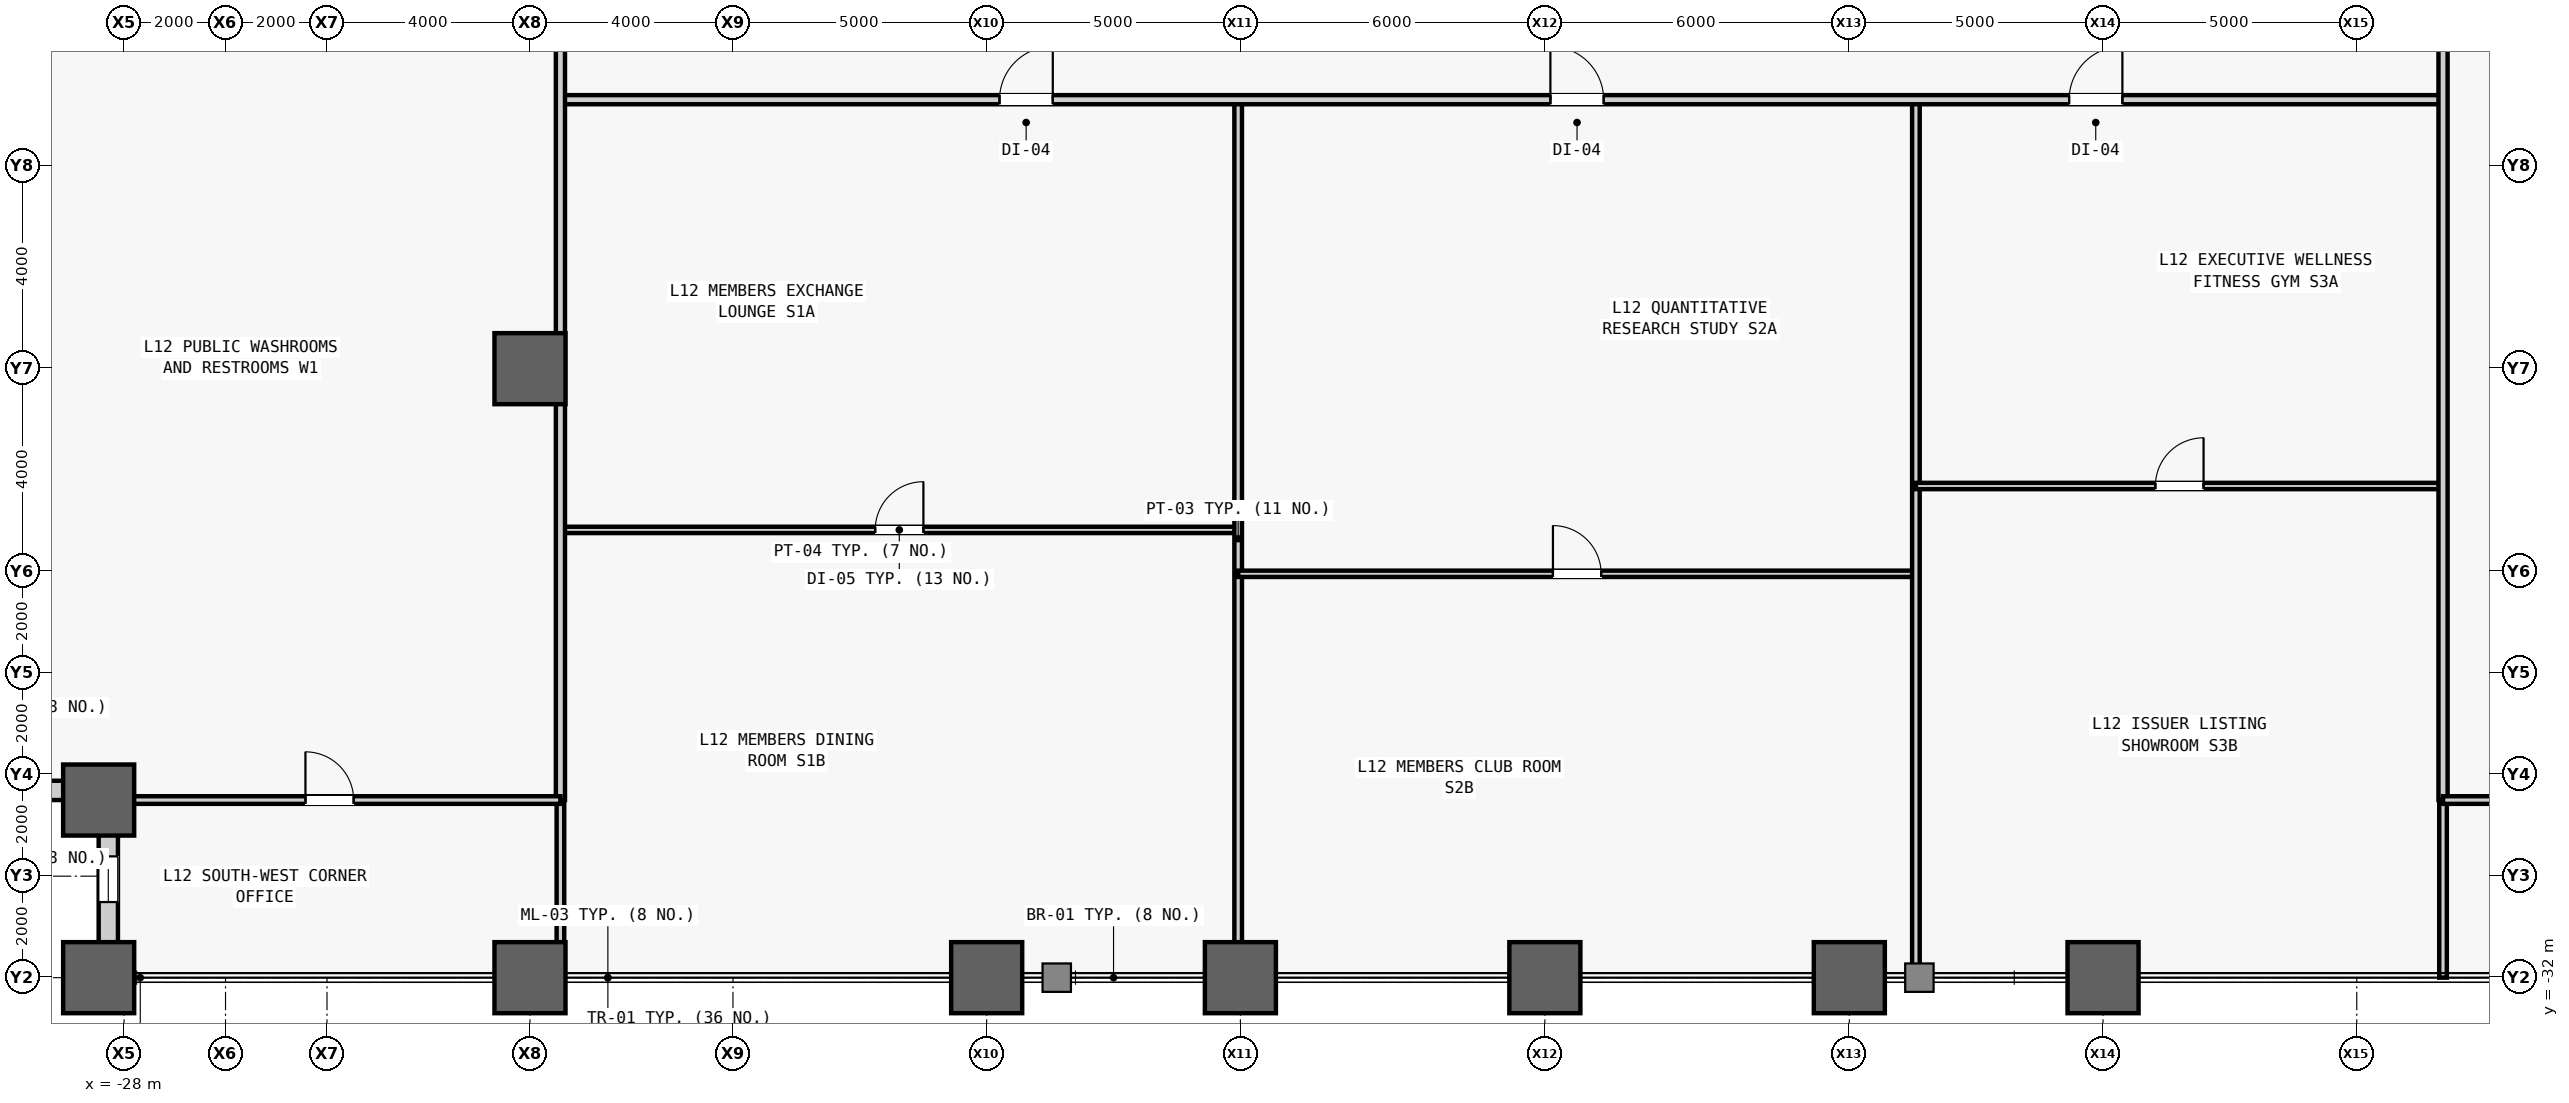
"""IFC4 building model, lengths in metres.
Left out: names, types, materials, properties, quantities, classifications, styles, units other than length and angle.
Written with IfcOpenShell. Run it as: python <this file> out.ifc"""

import sys

from ifc_helpers import new_model, si_unit, direction, frame, frame_2d, origin, origin_2d, place, context, subcontext, project, spatial, rectangle, hollow_rectangle, extrude, source, transform, mapped, element, fill, save


model = new_model("IFC4")
c1 = context("Model", 3, precision=1e-05, world=origin(), true_north=direction((0.0, 1.0)))
c2 = subcontext(c1, "Body", "Model", "MODEL_VIEW")
j1 = project(units=[si_unit("LENGTHUNIT", "METRE"), si_unit("PLANEANGLEUNIT", "RADIAN")], contexts=[c1])
p1 = place(None, origin())
s1 = spatial("IfcSite", under=j1, at=p1, CompositionType="ELEMENT")
p2 = place(p1, origin())
s2 = spatial("IfcBuilding", under=s1, at=p2, CompositionType="ELEMENT")
p3 = place(p2, frame((0.0, 0.0, 57.8)))
s3 = spatial("IfcBuildingStorey", under=s2, at=p3, CompositionType="ELEMENT", Elevation=57.8)
m1 = source(origin(), c2, "Body", "SweptSolid", [
    extrude(hollow_rectangle(XDim=1.4, YDim=1.4, WallThickness=0.075, at=origin_2d()), origin(), (0.0, 0.0, 1.0), 4.2),
])
for number, where, z_axis, x_axis in (
    (1, (-28.5, -32.0, 0.0), (0.0, 0.0, 1.0), (1.0, 0.0, 0.0)),
    (2, (-28.5, -28.5, 0.0), (0.0, 0.0, 1.0), (1.0, 0.0, 0.0)),
    (3, (-20.0, -32.0, 0.0), (0.0, 0.0, 1.0), (1.0, 0.0, 0.0)),
    (4, (-20.0, -20.0, 0.0), (0.0, 0.0, 1.0), (1.0, 0.0, 0.0)),
    (5, (-11.0, -32.0, 0.0), (0.0, 0.0, 1.0), (1.0, 0.0, 0.0)),
    (6, (-6.0, -32.0, 0.0), (0.0, 0.0, 1.0), (1.0, 0.0, 0.0)),
    (7, (0.0, -32.0, 0.0), (0.0, 0.0, 1.0), (1.0, 0.0, 0.0)),
    (8, (6.0, -32.0, 0.0), (0.0, 0.0, 1.0), (1.0, 0.0, 0.0)),
    (9, (11.0, -32.0, 0.0), (0.0, 0.0, 1.0), (1.0, 0.0, 0.0)),
):
    element("IfcColumn", number, at=place(p3, frame(where, z_axis=z_axis, x_axis=x_axis)), inside=s3, PredefinedType="COLUMN", context=c2, shape_type="MappedRepresentation", body=[
        mapped(m1, transform((0.0, 0.0, 0.0), scale=1.0)),
    ])
m2 = source(origin(), c2, "Body", "SweptSolid", [
    extrude(rectangle(XDim=3.12, YDim=0.38, at=frame_2d((1.56, 0.0))), origin(), (0.0, 0.0, 1.0), 3.245),
])
p4 = place(p3, frame((-28.5, -28.31, 0.0), z_axis=(0.0, 0.0, 1.0), x_axis=(-1.0, 0.0, 0.0)))
e10 = element("IfcWall", 10, at=p4, inside=s3, PredefinedType="STANDARD", context=c2, shape_type="MappedRepresentation", body=[
    mapped(m2, transform((0.0, 0.0, 0.0), scale=1.0)),
])
m3 = source(origin(), c2, "Body", "SweptSolid", [
    extrude(rectangle(XDim=0.9, YDim=2.4, at=frame_2d((0.45, 1.2))), frame((0.0, 0.2, 0.0), z_axis=(0.0, -1.0, 0.0), x_axis=(1.0, 0.0, 0.0)), (0.0, 0.0, 1.0), 0.4),
])
p5 = place(p4, frame((1.11, 0.0, 0.5)))
e11 = element("IfcOpeningElement", 11, at=p5, cuts=e10, PredefinedType="OPENING", context=c2, shape_type="MappedRepresentation", body=[
    mapped(m3, transform((0.0, 0.0, 0.0), scale=1.0)),
])
p6 = place(p3, frame((-28.31, -31.62, 0.0), z_axis=(0.0, 0.0, 1.0), x_axis=(0.0, 1.0, 0.0)))
e12 = element("IfcWall", 12, at=p6, inside=s3, PredefinedType="STANDARD", context=c2, shape_type="MappedRepresentation", body=[
    mapped(m2, transform((0.0, 0.0, 0.0), scale=1.0)),
])
p7 = place(p6, frame((1.11, 0.0, 0.5)))
e13 = element("IfcOpeningElement", 13, at=p7, cuts=e12, PredefinedType="OPENING", context=c2, shape_type="MappedRepresentation", body=[
    mapped(m3, transform((0.0, 0.0, 0.0), scale=1.0)),
])
m4 = source(origin(), c2, "Body", "SweptSolid", [
    extrude(rectangle(XDim=13.356, YDim=0.125, at=frame_2d((6.678, 0.0))), origin(), (0.0, 0.0, 1.0), 3.94),
])
p8 = place(p3, frame((-19.4, -23.177, 0.0), z_axis=(0.0, 0.0, 1.0), x_axis=(1.0, 0.0, 0.0)))
e14 = element("IfcWall", 14, at=p8, inside=s3, PredefinedType="PARTITIONING", context=c2, shape_type="MappedRepresentation", body=[
    mapped(m4, transform((0.0, 0.0, 0.0), scale=1.0)),
])
m5 = source(origin(), c2, "Body", "SweptSolid", [
    extrude(rectangle(XDim=0.95, YDim=2.15, at=frame_2d((0.475, 1.075))), frame((0.0, 0.073, 0.0), z_axis=(0.0, -1.0, 0.0), x_axis=(1.0, 0.0, 0.0)), (0.0, 0.0, 1.0), 0.145),
])
p9 = place(p8, frame((6.203, 0.0, 0.0)))
e15 = element("IfcOpeningElement", 15, at=p9, cuts=e14, PredefinedType="OPENING", context=c2, shape_type="MappedRepresentation", body=[
    mapped(m5, transform((0.0, 0.0, 0.0), scale=1.0)),
])
m6 = source(origin(), c2, "Body", "SweptSolid", [
    extrude(rectangle(XDim=17.3, YDim=0.15, at=frame_2d((8.65, 0.0))), origin(), (0.0, 0.0, 1.0), 3.085),
])
p10 = place(p3, frame((-6.044, -32.0, 0.0), z_axis=(0.0, 0.0, 1.0), x_axis=(0.0, 1.0, 0.0)))
e16 = element("IfcWall", 16, at=p10, inside=s3, PredefinedType="PARTITIONING", context=c2, shape_type="MappedRepresentation", body=[
    mapped(m6, transform((0.0, 0.0, 0.0), scale=1.0)),
])
p11 = place(p3, frame((-6.044, -24.042, 0.0), z_axis=(0.0, 0.0, 1.0), x_axis=(1.0, 0.0, 0.0)))
e17 = element("IfcWall", 17, at=p11, inside=s3, PredefinedType="PARTITIONING", context=c2, shape_type="MappedRepresentation", body=[
    mapped(m4, transform((0.0, 0.0, 0.0), scale=1.0)),
])
p12 = place(p11, frame((6.203, 0.0, 0.0)))
e18 = element("IfcOpeningElement", 18, at=p12, cuts=e17, PredefinedType="OPENING", context=c2, shape_type="MappedRepresentation", body=[
    mapped(m5, transform((0.0, 0.0, 0.0), scale=1.0)),
])
m7 = source(origin(), c2, "Body", "SweptSolid", [
    extrude(rectangle(XDim=17.3, YDim=0.15, at=frame_2d((8.65, 0.0))), origin(), (0.0, 0.0, 1.0), 3.94),
])
p13 = place(p3, frame((7.312, -32.0, 0.0), z_axis=(0.0, 0.0, 1.0), x_axis=(0.0, 1.0, 0.0)))
e19 = element("IfcWall", 19, at=p13, inside=s3, PredefinedType="PARTITIONING", context=c2, shape_type="MappedRepresentation", body=[
    mapped(m7, transform((0.0, 0.0, 0.0), scale=1.0)),
])
m8 = source(origin(), c2, "Body", "SweptSolid", [
    extrude(rectangle(XDim=10.388, YDim=0.125, at=frame_2d((5.194, 0.0))), origin(), (0.0, 0.0, 1.0), 3.94),
])
p14 = place(p3, frame((7.312, -22.312, 0.0), z_axis=(0.0, 0.0, 1.0), x_axis=(1.0, 0.0, 0.0)))
e20 = element("IfcWall", 20, at=p14, inside=s3, PredefinedType="PARTITIONING", context=c2, shape_type="MappedRepresentation", body=[
    mapped(m8, transform((0.0, 0.0, 0.0), scale=1.0)),
])
p15 = place(p14, frame((4.719, 0.0, 0.0)))
e21 = element("IfcOpeningElement", 21, at=p15, cuts=e20, PredefinedType="OPENING", context=c2, shape_type="MappedRepresentation", body=[
    mapped(m5, transform((0.0, 0.0, 0.0), scale=1.0)),
])
m9 = source(origin(), c2, "Body", "SweptSolid", [
    extrude(rectangle(XDim=37.1, YDim=0.18, at=frame_2d((18.55, 0.0))), origin(), (0.0, 0.0, 1.0), 3.94),
])
p16 = place(p3, frame((-19.4, -14.7, 0.0), z_axis=(0.0, 0.0, 1.0), x_axis=(1.0, 0.0, 0.0)))
e22 = element("IfcWall", 22, at=p16, inside=s3, PredefinedType="PARTITIONING", context=c2, shape_type="MappedRepresentation", body=[
    mapped(m9, transform((0.0, 0.0, 0.0), scale=1.0)),
])
m10 = source(origin(), c2, "Body", "SweptSolid", [
    extrude(rectangle(XDim=1.05, YDim=2.2, at=frame_2d((0.525, 1.1))), frame((0.0, 0.1, 0.0), z_axis=(0.0, -1.0, 0.0), x_axis=(1.0, 0.0, 0.0)), (0.0, 0.0, 1.0), 0.2),
])
p17 = place(p16, frame((8.653, 0.0, 0.0)))
e23 = element("IfcOpeningElement", 23, at=p17, cuts=e22, PredefinedType="OPENING", context=c2, shape_type="MappedRepresentation", body=[
    mapped(m10, transform((0.0, 0.0, 0.0), scale=1.0)),
])
p18 = place(p16, frame((19.509, 0.0, 0.0)))
e24 = element("IfcOpeningElement", 24, at=p18, cuts=e22, PredefinedType="OPENING", context=c2, shape_type="MappedRepresentation", body=[
    mapped(m10, transform((0.0, 0.0, 0.0), scale=1.0)),
])
p19 = place(p16, frame((29.731, 0.0, 0.0)))
e25 = element("IfcOpeningElement", 25, at=p19, cuts=e22, PredefinedType="OPENING", context=c2, shape_type="MappedRepresentation", body=[
    mapped(m10, transform((0.0, 0.0, 0.0), scale=1.0)),
])
m11 = source(origin(), c2, "Body", "SweptSolid", [
    extrude(rectangle(XDim=3.5, YDim=0.15, at=frame_2d((1.75, 0.0))), origin(), (0.0, 0.0, 1.0), 3.94),
])
for number, where, z_axis, x_axis in (
    (26, (-19.4, -32.0, 0.0), (0.0, 0.0, 1.0), (0.0, 1.0, 0.0)),
    (27, (17.7, -32.0, 0.0), (0.0, 0.0, 1.0), (0.0, 1.0, 0.0)),
):
    element("IfcWall", number, at=place(p3, frame(where, z_axis=z_axis, x_axis=x_axis)), inside=s3, PredefinedType="PARTITIONING", context=c2, shape_type="MappedRepresentation", body=[
        mapped(m11, transform((0.0, 0.0, 0.0), scale=1.0)),
    ])
m12 = source(origin(), c2, "Body", "SweptSolid", [
    extrude(rectangle(XDim=57.0, YDim=0.18, at=frame_2d((28.5, 0.0))), origin(), (0.0, 0.0, 1.0), 3.471),
])
p20 = place(p3, frame((-19.4, -28.5, 0.0), z_axis=(0.0, 0.0, 1.0), x_axis=(0.0, 1.0, 0.0)))
e28 = element("IfcWall", 28, at=p20, inside=s3, PredefinedType="PARTITIONING", context=c2, shape_type="MappedRepresentation", body=[
    mapped(m12, transform((0.0, 0.0, 0.0), scale=1.0)),
])
m13 = source(origin(), c2, "Body", "SweptSolid", [
    extrude(rectangle(XDim=0.95, YDim=2.15, at=frame_2d((0.475, 1.075))), frame((0.0, 0.1, 0.0), z_axis=(0.0, -1.0, 0.0), x_axis=(1.0, 0.0, 0.0)), (0.0, 0.0, 1.0), 0.2),
])
p21 = place(p20, frame((16.455, 0.0, 0.0)))
e29 = element("IfcOpeningElement", 29, at=p21, cuts=e28, PredefinedType="OPENING", context=c2, shape_type="MappedRepresentation", body=[
    mapped(m13, transform((0.0, 0.0, 0.0), scale=1.0)),
])
p22 = place(p20, frame((22.664, 0.0, 0.0)))
e30 = element("IfcOpeningElement", 30, at=p22, cuts=e28, PredefinedType="OPENING", context=c2, shape_type="MappedRepresentation", body=[
    mapped(m13, transform((0.0, 0.0, 0.0), scale=1.0)),
])
p23 = place(p20, frame((30.305, 0.0, 0.0)))
e31 = element("IfcOpeningElement", 31, at=p23, cuts=e28, PredefinedType="OPENING", context=c2, shape_type="MappedRepresentation", body=[
    mapped(m13, transform((0.0, 0.0, 0.0), scale=1.0)),
])
p24 = place(p20, frame((37.646, 0.0, 0.0)))
e32 = element("IfcOpeningElement", 32, at=p24, cuts=e28, PredefinedType="OPENING", context=c2, shape_type="MappedRepresentation", body=[
    mapped(m13, transform((0.0, 0.0, 0.0), scale=1.0)),
])
m14 = source(origin(), c2, "Body", "SweptSolid", [
    extrude(rectangle(XDim=57.0, YDim=0.18, at=frame_2d((28.5, 0.0))), origin(), (0.0, 0.0, 1.0), 3.94),
])
p25 = place(p3, frame((17.7, -28.5, 0.0), z_axis=(0.0, 0.0, 1.0), x_axis=(0.0, 1.0, 0.0)))
e33 = element("IfcWall", 33, at=p25, inside=s3, PredefinedType="PARTITIONING", context=c2, shape_type="MappedRepresentation", body=[
    mapped(m14, transform((0.0, 0.0, 0.0), scale=1.0)),
])
p26 = place(p25, frame((20.7, 0.0, 0.0)))
e34 = element("IfcOpeningElement", 34, at=p26, cuts=e33, PredefinedType="OPENING", context=c2, shape_type="MappedRepresentation", body=[
    mapped(m13, transform((0.0, 0.0, 0.0), scale=1.0)),
])
p27 = place(p25, frame((34.25, 0.0, 0.0)))
e35 = element("IfcOpeningElement", 35, at=p27, cuts=e33, PredefinedType="OPENING", context=c2, shape_type="MappedRepresentation", body=[
    mapped(m13, transform((0.0, 0.0, 0.0), scale=1.0)),
])
m15 = source(origin(), c2, "Body", "SweptSolid", [
    extrude(rectangle(XDim=9.1, YDim=0.15, at=frame_2d((4.55, 0.0))), origin(), (0.0, 0.0, 1.0), 3.94),
])
p28 = place(p3, frame((-28.5, -28.5, 0.0), z_axis=(0.0, 0.0, 1.0), x_axis=(1.0, 0.0, 0.0)))
e36 = element("IfcWall", 36, at=p28, inside=s3, PredefinedType="PARTITIONING", context=c2, shape_type="MappedRepresentation", body=[
    mapped(m15, transform((0.0, 0.0, 0.0), scale=1.0)),
])
m16 = source(origin(), c2, "Body", "SweptSolid", [
    extrude(rectangle(XDim=0.95, YDim=2.15, at=frame_2d((0.475, 1.075))), frame((0.0, 0.085, 0.0), z_axis=(0.0, -1.0, 0.0), x_axis=(1.0, 0.0, 0.0)), (0.0, 0.0, 1.0), 0.17),
])
p29 = place(p28, frame((4.075, 0.0, 0.0)))
e37 = element("IfcOpeningElement", 37, at=p29, cuts=e36, PredefinedType="OPENING", context=c2, shape_type="MappedRepresentation", body=[
    mapped(m16, transform((0.0, 0.0, 0.0), scale=1.0)),
])
m17 = source(origin(), c2, "Body", "SweptSolid", [
    extrude(rectangle(XDim=10.8, YDim=0.15, at=frame_2d((5.4, 0.0))), origin(), (0.0, 0.0, 1.0), 3.94),
])
p30 = place(p3, frame((17.7, -28.5, 0.0), z_axis=(0.0, 0.0, 1.0), x_axis=(1.0, 0.0, 0.0)))
e38 = element("IfcWall", 38, at=p30, inside=s3, PredefinedType="PARTITIONING", context=c2, shape_type="MappedRepresentation", body=[
    mapped(m17, transform((0.0, 0.0, 0.0), scale=1.0)),
])
p31 = place(p30, frame((4.925, 0.0, 0.0)))
e39 = element("IfcOpeningElement", 39, at=p31, cuts=e38, PredefinedType="OPENING", context=c2, shape_type="MappedRepresentation", body=[
    mapped(m16, transform((0.0, 0.0, 0.0), scale=1.0)),
])
m18 = source(origin(), c2, "Body", "SweptSolid", [
    extrude(rectangle(XDim=0.9, YDim=2.4, at=frame_2d((0.45, 1.2))), frame((0.0, 0.03, 0.0), z_axis=(0.0, -1.0, 0.0), x_axis=(1.0, 0.0, 0.0)), (0.0, 0.0, 1.0), 0.06),
])
p32 = place(p7, origin())
e40 = element("IfcWindow", 40, at=p32, inside=s3, PartitioningType="SINGLE_PANEL", PredefinedType="WINDOW", context=c2, shape_type="MappedRepresentation", body=[
    mapped(m18, transform((0.0, 0.0, 0.0), scale=1.0)),
])
fill(e13, e40)
m19 = source(origin(), c2, "Body", "SweptSolid", [
    extrude(rectangle(XDim=0.95, YDim=2.15, at=frame_2d((0.475, 1.075))), frame((0.0, 0.025, 0.0), z_axis=(0.0, -1.0, 0.0), x_axis=(1.0, 0.0, 0.0)), (0.0, 0.0, 1.0), 0.05),
])
p33 = place(p9, origin())
e41 = element("IfcDoor", 41, at=p33, inside=s3, OperationType="SINGLE_SWING_RIGHT", PredefinedType="DOOR", context=c2, shape_type="MappedRepresentation", body=[
    mapped(m19, transform((0.0, 0.0, 0.0), scale=1.0)),
])
fill(e15, e41)
p34 = place(p12, origin())
e42 = element("IfcDoor", 42, at=p34, inside=s3, OperationType="SINGLE_SWING_LEFT", PredefinedType="DOOR", context=c2, shape_type="MappedRepresentation", body=[
    mapped(m19, transform((0.0, 0.0, 0.0), scale=1.0)),
])
fill(e18, e42)
p35 = place(p15, origin())
e43 = element("IfcDoor", 43, at=p35, inside=s3, OperationType="SINGLE_SWING_RIGHT", PredefinedType="DOOR", context=c2, shape_type="MappedRepresentation", body=[
    mapped(m19, transform((0.0, 0.0, 0.0), scale=1.0)),
])
fill(e21, e43)
m20 = source(origin(), c2, "Body", "SweptSolid", [
    extrude(rectangle(XDim=1.05, YDim=2.2, at=frame_2d((0.525, 1.1))), frame((0.0, 0.025, 0.0), z_axis=(0.0, -1.0, 0.0), x_axis=(1.0, 0.0, 0.0)), (0.0, 0.0, 1.0), 0.05),
])
p36 = place(p17, origin())
e44 = element("IfcDoor", 44, at=p36, inside=s3, OperationType="SINGLE_SWING_RIGHT", PredefinedType="DOOR", context=c2, shape_type="MappedRepresentation", body=[
    mapped(m20, transform((0.0, 0.0, 0.0), scale=1.0)),
])
fill(e23, e44)
p37 = place(p18, origin())
e45 = element("IfcDoor", 45, at=p37, inside=s3, OperationType="SINGLE_SWING_LEFT", PredefinedType="DOOR", context=c2, shape_type="MappedRepresentation", body=[
    mapped(m20, transform((0.0, 0.0, 0.0), scale=1.0)),
])
fill(e24, e45)
p38 = place(p19, origin())
e46 = element("IfcDoor", 46, at=p38, inside=s3, OperationType="SINGLE_SWING_RIGHT", PredefinedType="DOOR", context=c2, shape_type="MappedRepresentation", body=[
    mapped(m20, transform((0.0, 0.0, 0.0), scale=1.0)),
])
fill(e25, e46)
p39 = place(p29, origin())
e47 = element("IfcDoor", 47, at=p39, inside=s3, OperationType="SINGLE_SWING_LEFT", PredefinedType="DOOR", context=c2, shape_type="MappedRepresentation", body=[
    mapped(m19, transform((0.0, 0.0, 0.0), scale=1.0)),
])
fill(e37, e47)
save(model, sys.argv[1])
